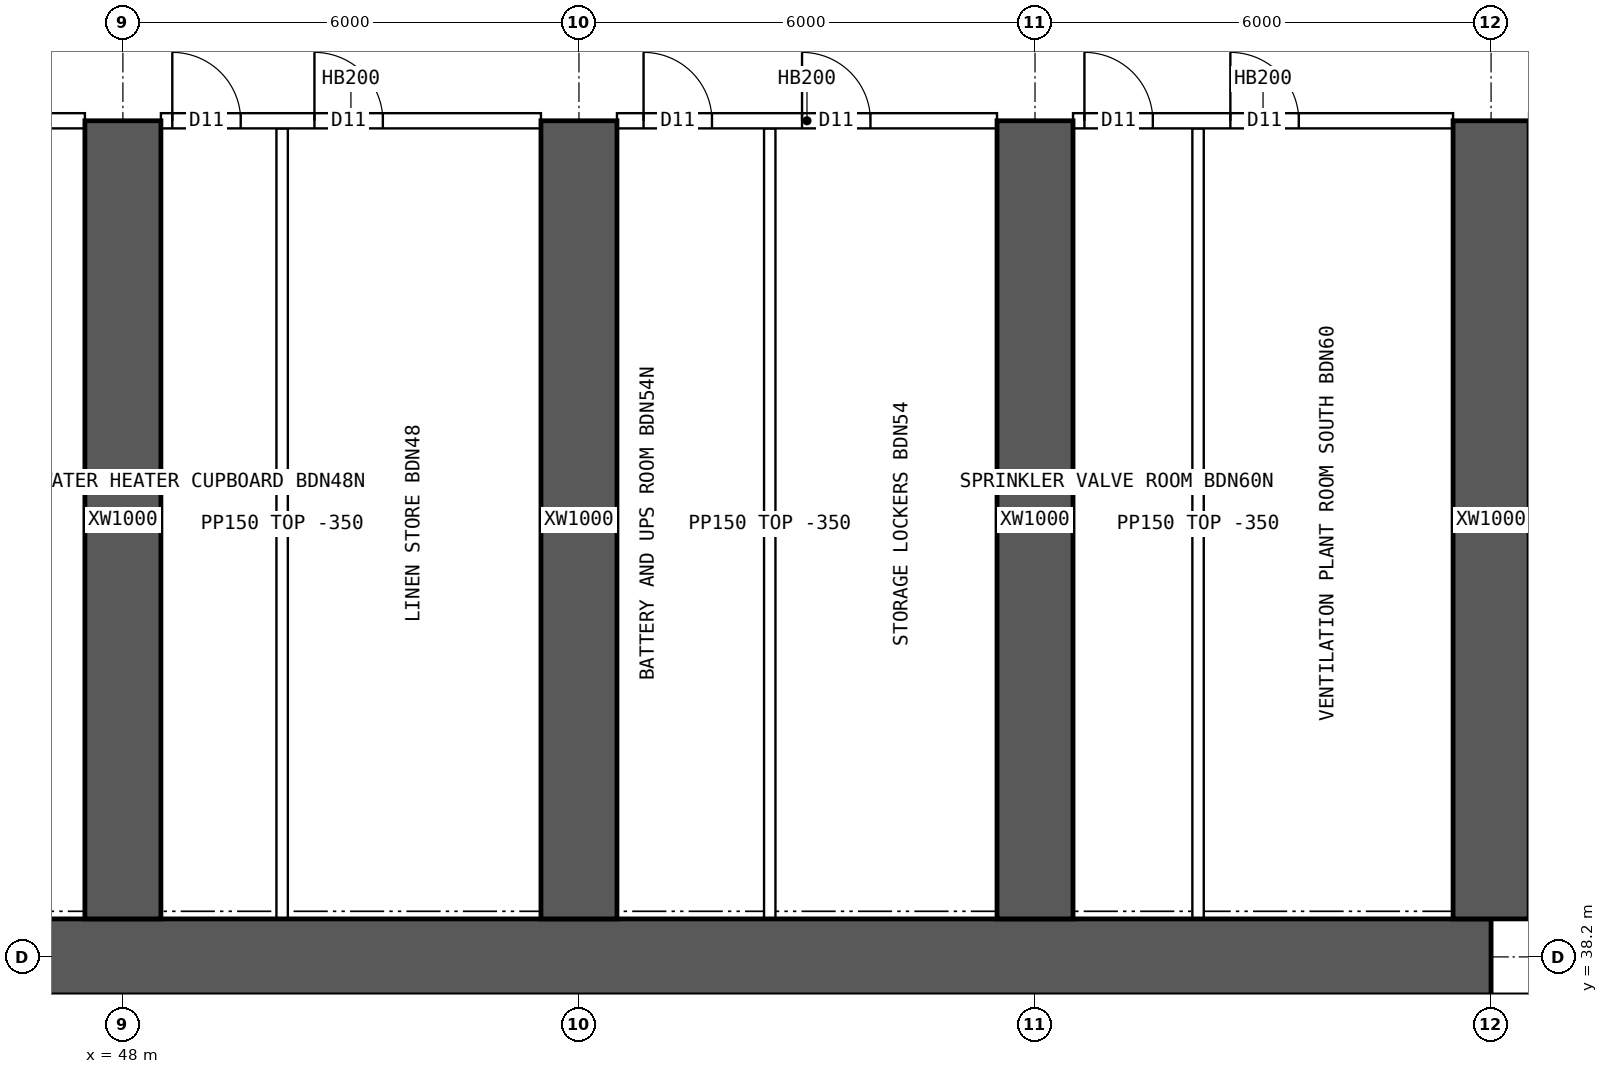
"""IFC4 building model, lengths in metres.
Left out: names, types, materials, properties, quantities, classifications, styles, units other than length and angle.
Written with IfcOpenShell. Run it as: python <this file> out.ifc"""

import sys

from ifc_helpers import new_model, si_unit, direction, frame, frame_2d, origin, place, context, subcontext, project, spatial, rectangle, extrude, element, fill, save


model = new_model("IFC4")
c1 = context("Model", 3, precision=1e-05, world=origin(), true_north=direction((0.0, 1.0)))
c2 = subcontext(c1, "Body", "Model", "MODEL_VIEW")
j1 = project(units=[si_unit("LENGTHUNIT", "METRE"), si_unit("PLANEANGLEUNIT", "RADIAN")], contexts=[c1])
p1 = place(None, origin())
s1 = spatial("IfcSite", under=j1, at=p1, CompositionType="ELEMENT")
p2 = place(p1, origin())
s2 = spatial("IfcBuilding", under=s1, at=p2, CompositionType="ELEMENT")
p3 = place(p2, frame((0.0, 0.0, 65.2)))
s3 = spatial("IfcBuildingStorey", under=s2, at=p3, CompositionType="ELEMENT", Elevation=65.2)
p4 = place(p3, frame((18.0, 38.2, 0.0), z_axis=(0.0, 0.0, 1.0), x_axis=(1.0, 0.0, 0.0)))
e1 = element("IfcWall", 1, at=p4, inside=s3, PredefinedType="SHEAR", context=c2, shape_type="SweptSolid", body=[
    extrude(rectangle(XDim=48.0, YDim=1.0, at=frame_2d((24.0, 0.0))), origin(), (0.0, 0.0, 1.0), 3.75),
])
for number, where, z_axis, x_axis in (
    (2, (62.4, 34.75, 0.0), (0.0, 0.0, 1.0), (0.0, 1.0, 0.0)),
    (3, (58.0, 34.75, 0.0), (0.0, 0.0, 1.0), (0.0, 1.0, 0.0)),
):
    element("IfcWall", number, at=place(p3, frame(where, z_axis=z_axis, x_axis=x_axis)), inside=s3, PredefinedType="SHEAR", context=c2, shape_type="SweptSolid", body=[
        extrude(rectangle(XDim=2.95, YDim=0.3, at=frame_2d((1.475, 0.0))), origin(), (0.0, 0.0, 1.0), 3.75),
    ])
for number, where, z_axis, x_axis in (
    (4, (48.0, 38.7, 0.0), (0.0, 0.0, 1.0), (0.0, 1.0, 0.0)),
    (5, (54.0, 38.7, 0.0), (0.0, 0.0, 1.0), (0.0, 1.0, 0.0)),
    (6, (60.0, 38.7, 0.0), (0.0, 0.0, 1.0), (0.0, 1.0, 0.0)),
    (7, (66.0, 38.7, 0.0), (0.0, 0.0, 1.0), (0.0, 1.0, 0.0)),
):
    element("IfcWall", number, at=place(p3, frame(where, z_axis=z_axis, x_axis=x_axis)), inside=s3, PredefinedType="SHEAR", context=c2, shape_type="SweptSolid", body=[
        extrude(rectangle(XDim=10.5, YDim=1.0, at=frame_2d((5.25, 0.0))), origin(), (0.0, 0.0, 1.0), 3.75),
    ])
for number, where, z_axis, x_axis in (
    (8, (47.058, 34.75, 0.0), (0.0, 0.0, 1.0), (0.0, 1.0, 0.0)),
    (9, (50.503, 34.75, 0.0), (0.0, 0.0, 1.0), (0.0, 1.0, 0.0)),
    (10, (54.758, 34.75, 0.0), (0.0, 0.0, 1.0), (0.0, 1.0, 0.0)),
):
    element("IfcWall", number, at=place(p3, frame(where, z_axis=z_axis, x_axis=x_axis)), inside=s3, PredefinedType="SOLIDWALL", context=c2, shape_type="SweptSolid", body=[
        extrude(rectangle(XDim=2.95, YDim=0.15, at=frame_2d((1.475, 0.0))), origin(), (0.0, 0.0, 1.0), 3.4),
    ])
p5 = place(p3, frame((42.5, 49.2, 0.0), z_axis=(0.0, 0.0, 1.0), x_axis=(1.0, 0.0, 0.0)))
e11 = element("IfcWall", 11, at=p5, inside=s3, PredefinedType="SOLIDWALL", context=c2, shape_type="SweptSolid", body=[
    extrude(rectangle(XDim=5.0, YDim=0.2, at=frame_2d((2.5, 0.0))), origin(), (0.0, 0.0, 1.0), 3.4),
])
p6 = place(p5, frame((0.35, 0.0, 0.0)))
e12 = element("IfcOpeningElement", 12, at=p6, cuts=e11, PredefinedType="OPENING", context=c2, shape_type="SweptSolid", body=[
    extrude(rectangle(XDim=0.9, YDim=2.1, at=frame_2d((0.45, 1.05))), frame((0.0, 0.11, 0.0), z_axis=(0.0, -1.0, 0.0), x_axis=(1.0, 0.0, 0.0)), (0.0, 0.0, 1.0), 0.22),
])
p7 = place(p5, frame((2.495, 0.0, 0.0)))
e13 = element("IfcOpeningElement", 13, at=p7, cuts=e11, PredefinedType="OPENING", context=c2, shape_type="SweptSolid", body=[
    extrude(rectangle(XDim=0.9, YDim=2.1, at=frame_2d((0.45, 1.05))), frame((0.0, 0.11, 0.0), z_axis=(0.0, -1.0, 0.0), x_axis=(1.0, 0.0, 0.0)), (0.0, 0.0, 1.0), 0.22),
])
p8 = place(p3, frame((48.5, 49.2, 0.0), z_axis=(0.0, 0.0, 1.0), x_axis=(1.0, 0.0, 0.0)))
e14 = element("IfcWall", 14, at=p8, inside=s3, PredefinedType="SOLIDWALL", context=c2, shape_type="SweptSolid", body=[
    extrude(rectangle(XDim=5.0, YDim=0.2, at=frame_2d((2.5, 0.0))), origin(), (0.0, 0.0, 1.0), 3.4),
])
p9 = place(p8, frame((0.15, 0.0, 0.0)))
e15 = element("IfcOpeningElement", 15, at=p9, cuts=e14, PredefinedType="OPENING", context=c2, shape_type="SweptSolid", body=[
    extrude(rectangle(XDim=0.9, YDim=2.1, at=frame_2d((0.45, 1.05))), frame((0.0, 0.11, 0.0), z_axis=(0.0, -1.0, 0.0), x_axis=(1.0, 0.0, 0.0)), (0.0, 0.0, 1.0), 0.22),
])
p10 = place(p8, frame((2.02, 0.0, 0.0)))
e16 = element("IfcOpeningElement", 16, at=p10, cuts=e14, PredefinedType="OPENING", context=c2, shape_type="SweptSolid", body=[
    extrude(rectangle(XDim=0.9, YDim=2.1, at=frame_2d((0.45, 1.05))), frame((0.0, 0.11, 0.0), z_axis=(0.0, -1.0, 0.0), x_axis=(1.0, 0.0, 0.0)), (0.0, 0.0, 1.0), 0.22),
])
p11 = place(p3, frame((54.5, 49.2, 0.0), z_axis=(0.0, 0.0, 1.0), x_axis=(1.0, 0.0, 0.0)))
e17 = element("IfcWall", 17, at=p11, inside=s3, PredefinedType="SOLIDWALL", context=c2, shape_type="SweptSolid", body=[
    extrude(rectangle(XDim=5.0, YDim=0.2, at=frame_2d((2.5, 0.0))), origin(), (0.0, 0.0, 1.0), 3.4),
])
p12 = place(p11, frame((0.35, 0.0, 0.0)))
e18 = element("IfcOpeningElement", 18, at=p12, cuts=e17, PredefinedType="OPENING", context=c2, shape_type="SweptSolid", body=[
    extrude(rectangle(XDim=0.9, YDim=2.1, at=frame_2d((0.45, 1.05))), frame((0.0, 0.11, 0.0), z_axis=(0.0, -1.0, 0.0), x_axis=(1.0, 0.0, 0.0)), (0.0, 0.0, 1.0), 0.22),
])
p13 = place(p11, frame((2.435, 0.0, 0.0)))
e19 = element("IfcOpeningElement", 19, at=p13, cuts=e17, PredefinedType="OPENING", context=c2, shape_type="SweptSolid", body=[
    extrude(rectangle(XDim=0.9, YDim=2.1, at=frame_2d((0.45, 1.05))), frame((0.0, 0.11, 0.0), z_axis=(0.0, -1.0, 0.0), x_axis=(1.0, 0.0, 0.0)), (0.0, 0.0, 1.0), 0.22),
])
p14 = place(p3, frame((60.5, 49.2, 0.0), z_axis=(0.0, 0.0, 1.0), x_axis=(1.0, 0.0, 0.0)))
e20 = element("IfcWall", 20, at=p14, inside=s3, PredefinedType="SOLIDWALL", context=c2, shape_type="SweptSolid", body=[
    extrude(rectangle(XDim=5.0, YDim=0.2, at=frame_2d((2.5, 0.0))), origin(), (0.0, 0.0, 1.0), 3.4),
])
p15 = place(p14, frame((0.15, 0.0, 0.0)))
e21 = element("IfcOpeningElement", 21, at=p15, cuts=e20, PredefinedType="OPENING", context=c2, shape_type="SweptSolid", body=[
    extrude(rectangle(XDim=0.9, YDim=2.1, at=frame_2d((0.45, 1.05))), frame((0.0, 0.11, 0.0), z_axis=(0.0, -1.0, 0.0), x_axis=(1.0, 0.0, 0.0)), (0.0, 0.0, 1.0), 0.22),
])
p16 = place(p14, frame((2.07, 0.0, 0.0)))
e22 = element("IfcOpeningElement", 22, at=p16, cuts=e20, PredefinedType="OPENING", context=c2, shape_type="SweptSolid", body=[
    extrude(rectangle(XDim=0.9, YDim=2.1, at=frame_2d((0.45, 1.05))), frame((0.0, 0.11, 0.0), z_axis=(0.0, -1.0, 0.0), x_axis=(1.0, 0.0, 0.0)), (0.0, 0.0, 1.0), 0.22),
])
for number, where, z_axis, x_axis in (
    (23, (50.095, 38.7, 0.0), (0.0, 0.0, 1.0), (0.0, 1.0, 0.0)),
    (24, (56.51, 38.7, 0.0), (0.0, 0.0, 1.0), (0.0, 1.0, 0.0)),
    (25, (62.145, 38.7, 0.0), (0.0, 0.0, 1.0), (0.0, 1.0, 0.0)),
):
    element("IfcWall", number, at=place(p3, frame(where, z_axis=z_axis, x_axis=x_axis)), inside=s3, PredefinedType="PARTITIONING", context=c2, shape_type="SweptSolid", body=[
        extrude(rectangle(XDim=10.4, YDim=0.15, at=frame_2d((5.2, 0.0))), origin(), (0.0, 0.0, 1.0), 3.4),
    ])
p17 = place(p9, origin())
e26 = element("IfcDoor", 26, at=p17, inside=s3, OperationType="SINGLE_SWING_LEFT", PredefinedType="DOOR", context=c2, shape_type="SweptSolid", body=[
    extrude(rectangle(XDim=0.9, YDim=2.1, at=frame_2d((0.45, 1.05))), frame((0.0, 0.025, 0.0), z_axis=(0.0, -1.0, 0.0), x_axis=(1.0, 0.0, 0.0)), (0.0, 0.0, 1.0), 0.05),
])
fill(e15, e26)
p18 = place(p10, origin())
e27 = element("IfcDoor", 27, at=p18, inside=s3, OperationType="SINGLE_SWING_LEFT", PredefinedType="DOOR", context=c2, shape_type="SweptSolid", body=[
    extrude(rectangle(XDim=0.9, YDim=2.1, at=frame_2d((0.45, 1.05))), frame((0.0, 0.025, 0.0), z_axis=(0.0, -1.0, 0.0), x_axis=(1.0, 0.0, 0.0)), (0.0, 0.0, 1.0), 0.05),
])
fill(e16, e27)
p19 = place(p12, origin())
e28 = element("IfcDoor", 28, at=p19, inside=s3, OperationType="SINGLE_SWING_LEFT", PredefinedType="DOOR", context=c2, shape_type="SweptSolid", body=[
    extrude(rectangle(XDim=0.9, YDim=2.1, at=frame_2d((0.45, 1.05))), frame((0.0, 0.025, 0.0), z_axis=(0.0, -1.0, 0.0), x_axis=(1.0, 0.0, 0.0)), (0.0, 0.0, 1.0), 0.05),
])
fill(e18, e28)
p20 = place(p13, origin())
e29 = element("IfcDoor", 29, at=p20, inside=s3, OperationType="SINGLE_SWING_LEFT", PredefinedType="DOOR", context=c2, shape_type="SweptSolid", body=[
    extrude(rectangle(XDim=0.9, YDim=2.1, at=frame_2d((0.45, 1.05))), frame((0.0, 0.025, 0.0), z_axis=(0.0, -1.0, 0.0), x_axis=(1.0, 0.0, 0.0)), (0.0, 0.0, 1.0), 0.05),
])
fill(e19, e29)
p21 = place(p15, origin())
e30 = element("IfcDoor", 30, at=p21, inside=s3, OperationType="SINGLE_SWING_LEFT", PredefinedType="DOOR", context=c2, shape_type="SweptSolid", body=[
    extrude(rectangle(XDim=0.9, YDim=2.1, at=frame_2d((0.45, 1.05))), frame((0.0, 0.025, 0.0), z_axis=(0.0, -1.0, 0.0), x_axis=(1.0, 0.0, 0.0)), (0.0, 0.0, 1.0), 0.05),
])
fill(e21, e30)
p22 = place(p16, origin())
e31 = element("IfcDoor", 31, at=p22, inside=s3, OperationType="SINGLE_SWING_LEFT", PredefinedType="DOOR", context=c2, shape_type="SweptSolid", body=[
    extrude(rectangle(XDim=0.9, YDim=2.1, at=frame_2d((0.45, 1.05))), frame((0.0, 0.025, 0.0), z_axis=(0.0, -1.0, 0.0), x_axis=(1.0, 0.0, 0.0)), (0.0, 0.0, 1.0), 0.05),
])
fill(e22, e31)
save(model, sys.argv[1])
